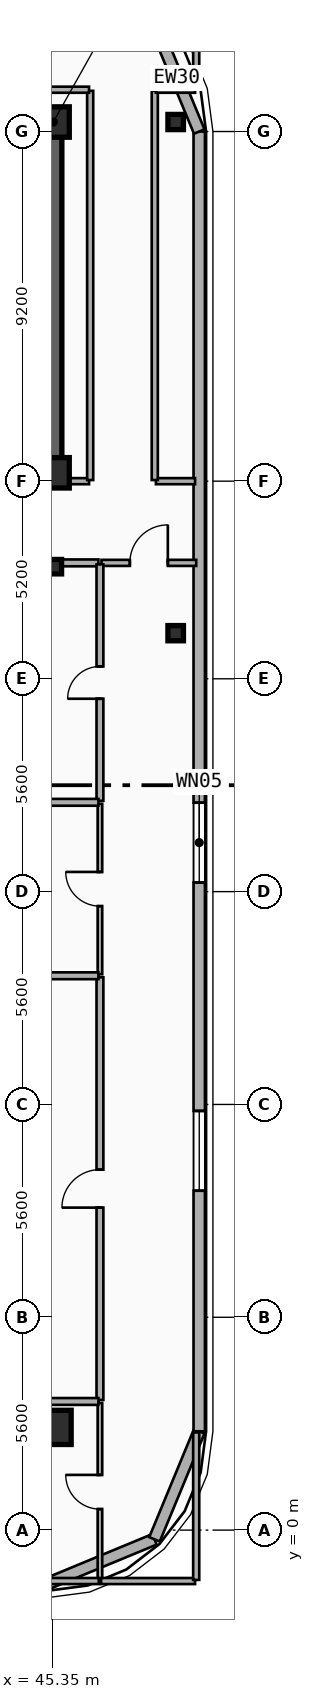
"""IFC4 building model, lengths in metres.
Left out: names, types, materials, properties, quantities, classifications, styles, units other than length and angle.
Written with IfcOpenShell. Run it as: python <this file> out.ifc"""

import sys

from ifc_helpers import new_model, si_unit, direction, frame, frame_2d, origin, origin_2d, place, context, subcontext, project, spatial, rectangle, i_section, extrude, element, fill, save


model = new_model("IFC4")
c1 = context("Model", 3, precision=1e-05, world=origin(), true_north=direction((0.0, 1.0)))
c2 = subcontext(c1, "Body", "Model", "MODEL_VIEW")
j1 = project(units=[si_unit("LENGTHUNIT", "METRE"), si_unit("PLANEANGLEUNIT", "RADIAN")], contexts=[c1])
p1 = place(None, origin())
s1 = spatial("IfcSite", under=j1, at=p1, CompositionType="ELEMENT")
p2 = place(p1, origin())
s2 = spatial("IfcBuilding", under=s1, at=p2, CompositionType="ELEMENT")
p3 = place(p2, frame((0.0, 0.0, 258.4)))
s3 = spatial("IfcBuildingStorey", under=s2, at=p3, CompositionType="ELEMENT", Elevation=258.4)
p4 = place(p3, frame((12.15, 37.05, 0.0), z_axis=(0.0, 0.0, 1.0), x_axis=(1.0, 0.0, 0.0)))
e1 = element("IfcWall", 1, at=p4, inside=s3, PredefinedType="SHEAR", context=c2, shape_type="SweptSolid", body=[
    extrude(rectangle(XDim=33.23, YDim=0.45, at=frame_2d((16.615, 0.0))), origin(), (0.0, 0.0, 1.0), 3.7),
])
p5 = place(p3, frame((45.38, 27.82, 0.0), z_axis=(0.0, 0.0, 1.0), x_axis=(-1.0, 0.0, 0.0)))
e2 = element("IfcWall", 2, at=p5, inside=s3, PredefinedType="SHEAR", context=c2, shape_type="SweptSolid", body=[
    extrude(rectangle(XDim=12.23, YDim=0.45, at=frame_2d((6.115, 0.0))), origin(), (0.0, 0.0, 1.0), 3.7),
])
p6 = place(p5, frame((9.93, 0.0, 0.0)))
e3 = element("IfcOpeningElement", 3, at=p6, cuts=e2, PredefinedType="OPENING", context=c2, shape_type="SweptSolid", body=[
    extrude(rectangle(XDim=1.1, YDim=2.15, at=frame_2d((0.55, 1.075))), frame((0.0, 0.235, 0.0), z_axis=(0.0, -1.0, 0.0), x_axis=(1.0, 0.0, 0.0)), (0.0, 0.0, 1.0), 0.47),
])
p7 = place(p5, frame((6.23, 0.0, 0.0)))
e4 = element("IfcOpeningElement", 4, at=p7, cuts=e2, PredefinedType="OPENING", context=c2, shape_type="SweptSolid", body=[
    extrude(rectangle(XDim=1.1, YDim=2.15, at=frame_2d((0.55, 1.075))), frame((0.0, 0.235, 0.0), z_axis=(0.0, -1.0, 0.0), x_axis=(1.0, 0.0, 0.0)), (0.0, 0.0, 1.0), 0.47),
])
p8 = place(p3, frame((45.38, 28.045, 0.0), z_axis=(0.0, 0.0, 1.0), x_axis=(0.0, 1.0, 0.0)))
e5 = element("IfcWall", 5, at=p8, inside=s3, PredefinedType="SHEAR", context=c2, shape_type="SweptSolid", body=[
    extrude(rectangle(XDim=8.78, YDim=0.45, at=frame_2d((4.39, 0.0))), origin(), (0.0, 0.0, 1.0), 3.7),
])
for number, where, z_axis, x_axis in (
    (6, (45.4, 27.82, 0.0), (0.0, 0.0, 1.0), (1.0, 0.0, 0.0)),
    (7, (45.4, 37.05, 0.0), (0.0, 0.0, 1.0), (1.0, 0.0, 0.0)),
):
    element("IfcColumn", number, at=place(p3, frame(where, z_axis=z_axis, x_axis=x_axis)), inside=s3, PredefinedType="COLUMN", context=c2, shape_type="SweptSolid", body=[
        extrude(rectangle(XDim=0.8, YDim=0.8, at=origin_2d()), origin(), (0.0, 0.0, 1.0), 3.7),
    ])
p9 = place(p3, frame((45.4, 25.35, 0.0), z_axis=(0.0, 0.0, 1.0), x_axis=(1.0, 0.0, 0.0)))
e8 = element("IfcColumn", 8, at=p9, inside=s3, PredefinedType="COLUMN", context=c2, shape_type="SweptSolid", body=[
    extrude(i_section(OverallWidth=0.395, OverallDepth=0.38, WebThickness=0.019, FlangeThickness=0.03, FilletRadius=0.015, at=origin_2d()), origin(), (0.0, 0.0, 1.0), 3.7),
])
p10 = place(p3, frame((45.4, 2.812, 0.0), z_axis=(0.0, -0.090221727315, 0.99592170371), x_axis=(1.0, 0.0, 0.0)))
e9 = element("IfcColumn", 9, at=p10, inside=s3, PredefinedType="COLUMN", context=c2, shape_type="SweptSolid", body=[
    extrude(rectangle(XDim=0.9, YDim=0.9, at=origin_2d()), origin(), (0.0, 0.0, 1.0), 3.715),
])
for number, where, z_axis, x_axis in (
    (10, (48.6, 23.6, 0.0), (0.0, 0.0, 1.0), (1.0, 0.0, 0.0)),
    (11, (48.6, 37.05, 0.0), (0.0, 0.0, 1.0), (1.0, 0.0, 0.0)),
):
    element("IfcColumn", number, at=place(p3, frame(where, z_axis=z_axis, x_axis=x_axis)), inside=s3, PredefinedType="COLUMN", context=c2, shape_type="SweptSolid", body=[
        extrude(i_section(OverallWidth=0.408, OverallDepth=0.4, WebThickness=0.025, FlangeThickness=0.039, FilletRadius=0.015, at=origin_2d()), origin(), (0.0, 0.0, 1.0), 3.7),
    ])
p11 = place(p3, frame((48.042, -0.243, 0.0), z_axis=(0.0, 0.0, 1.0), x_axis=(-0.92389884758, -0.382636798336, 0.0)))
e12 = element("IfcWall", 12, at=p11, inside=s3, PredefinedType="SOLIDWALL", context=c2, shape_type="SweptSolid", body=[
    extrude(rectangle(XDim=3.077, YDim=0.3, at=frame_2d((1.538, 0.0))), origin(), (0.0, 0.0, 1.0), 3.42),
])
p12 = place(p3, frame((49.22, 2.6, 0.0), z_axis=(0.0, 0.0, 1.0), x_axis=(-0.382676475685, -0.923882414032, 0.0)))
e13 = element("IfcWall", 13, at=p12, inside=s3, PredefinedType="SOLIDWALL", context=c2, shape_type="SweptSolid", body=[
    extrude(rectangle(XDim=3.077, YDim=0.3, at=frame_2d((1.539, 0.0))), origin(), (0.0, 0.0, 1.0), 3.42),
])
p13 = place(p3, frame((49.22, 36.8, 0.0), z_axis=(0.0, 0.0, 1.0), x_axis=(0.0, -1.0, 0.0)))
e14 = element("IfcWall", 14, at=p13, inside=s3, PredefinedType="SOLIDWALL", context=c2, shape_type="SweptSolid", body=[
    extrude(rectangle(XDim=34.2, YDim=0.3, at=frame_2d((17.1, 0.0))), origin(), (0.0, 0.0, 1.0), 3.42),
])
p14 = place(p13, frame((17.66, 0.0, 0.75)))
e15 = element("IfcOpeningElement", 15, at=p14, cuts=e14, PredefinedType="OPENING", context=c2, shape_type="SweptSolid", body=[
    extrude(rectangle(XDim=2.1, YDim=2.1, at=frame_2d((1.05, 1.05))), frame((0.0, 0.16, 0.0), z_axis=(0.0, -1.0, 0.0), x_axis=(1.0, 0.0, 0.0)), (0.0, 0.0, 1.0), 0.32),
])
p15 = place(p13, frame((25.77, 0.0, 0.75)))
e16 = element("IfcOpeningElement", 16, at=p15, cuts=e14, PredefinedType="OPENING", context=c2, shape_type="SweptSolid", body=[
    extrude(rectangle(XDim=2.1, YDim=2.1, at=frame_2d((1.05, 1.05))), frame((0.0, 0.16, 0.0), z_axis=(0.0, -1.0, 0.0), x_axis=(1.0, 0.0, 0.0)), (0.0, 0.0, 1.0), 0.32),
])
p16 = place(p3, frame((48.042, 39.643, 0.0), z_axis=(0.0, 0.0, 1.0), x_axis=(0.382704529509, -0.923870793506, 0.0)))
e17 = element("IfcWall", 17, at=p16, inside=s3, PredefinedType="SOLIDWALL", context=c2, shape_type="SweptSolid", body=[
    extrude(rectangle(XDim=3.077, YDim=0.3, at=frame_2d((1.538, 0.0))), origin(), (0.0, 0.0, 1.0), 3.42),
])
p17 = place(p3, frame((46.647, 25.45, 0.0), z_axis=(0.0, 0.0, 1.0), x_axis=(1.0, 0.0, 0.0)))
e18 = element("IfcWall", 18, at=p17, inside=s3, PredefinedType="PARTITIONING", context=c2, shape_type="SweptSolid", body=[
    extrude(rectangle(XDim=2.493, YDim=0.16, at=frame_2d((1.247, 0.0))), origin(), (0.0, 0.0, 1.0), 3.42),
])
p18 = place(p17, frame((0.747, 0.0, 0.0)))
e19 = element("IfcOpeningElement", 19, at=p18, cuts=e18, PredefinedType="OPENING", context=c2, shape_type="SweptSolid", body=[
    extrude(rectangle(XDim=1.0, YDim=2.15, at=frame_2d((0.5, 1.075))), frame((0.0, 0.09, 0.0), z_axis=(0.0, -1.0, 0.0), x_axis=(1.0, 0.0, 0.0)), (0.0, 0.0, 1.0), 0.18),
])
p19 = place(p3, frame((43.79, 25.45, 0.0), z_axis=(0.0, 0.0, 1.0), x_axis=(1.0, 0.0, 0.0)))
e20 = element("IfcWall", 20, at=p19, inside=s3, PredefinedType="PLUMBINGWALL", context=c2, shape_type="SweptSolid", body=[
    extrude(rectangle(XDim=2.777, YDim=0.18, at=frame_2d((1.388, 0.0))), origin(), (0.0, 0.0, 1.0), 2.7),
])
p20 = place(p3, frame((46.607, -1.34, 0.0), z_axis=(0.0, 0.0, 1.0), x_axis=(0.0, 1.0, 0.0)))
e21 = element("IfcWall", 21, at=p20, inside=s3, PredefinedType="PARTITIONING", context=c2, shape_type="SweptSolid", body=[
    extrude(rectangle(XDim=4.685, YDim=0.12, at=frame_2d((2.343, 0.0))), origin(), (0.0, 0.0, 1.0), 3.42),
])
p21 = place(p20, frame((1.893, 0.0, 0.0)))
e22 = element("IfcOpeningElement", 22, at=p21, cuts=e21, PredefinedType="OPENING", context=c2, shape_type="SweptSolid", body=[
    extrude(rectangle(XDim=0.9, YDim=2.1, at=frame_2d((0.45, 1.05))), frame((0.0, 0.07, 0.0), z_axis=(0.0, -1.0, 0.0), x_axis=(1.0, 0.0, 0.0)), (0.0, 0.0, 1.0), 0.14),
])
p22 = place(p3, frame((46.607, 3.425, 0.0), z_axis=(0.0, 0.0, 1.0), x_axis=(0.0, 1.0, 0.0)))
e23 = element("IfcWall", 23, at=p22, inside=s3, PredefinedType="PLUMBINGWALL", context=c2, shape_type="SweptSolid", body=[
    extrude(rectangle(XDim=11.121, YDim=0.18, at=frame_2d((5.561, 0.0))), origin(), (0.0, 0.0, 1.0), 3.42),
])
p23 = place(p22, frame((5.061, 0.0, 0.0)))
e24 = element("IfcOpeningElement", 24, at=p23, cuts=e23, PredefinedType="OPENING", context=c2, shape_type="SweptSolid", body=[
    extrude(rectangle(XDim=1.0, YDim=2.15, at=frame_2d((0.5, 1.075))), frame((0.0, 0.1, 0.0), z_axis=(0.0, -1.0, 0.0), x_axis=(1.0, 0.0, 0.0)), (0.0, 0.0, 1.0), 0.2),
])
p24 = place(p3, frame((46.607, 14.626, 0.0), z_axis=(0.0, 0.0, 1.0), x_axis=(0.0, 1.0, 0.0)))
e25 = element("IfcWall", 25, at=p24, inside=s3, PredefinedType="PARTITIONING", context=c2, shape_type="SweptSolid", body=[
    extrude(rectangle(XDim=4.484, YDim=0.12, at=frame_2d((2.242, 0.0))), origin(), (0.0, 0.0, 1.0), 3.42),
])
p25 = place(p24, frame((1.792, 0.0, 0.0)))
e26 = element("IfcOpeningElement", 26, at=p25, cuts=e25, PredefinedType="OPENING", context=c2, shape_type="SweptSolid", body=[
    extrude(rectangle(XDim=0.9, YDim=2.1, at=frame_2d((0.45, 1.05))), frame((0.0, 0.07, 0.0), z_axis=(0.0, -1.0, 0.0), x_axis=(1.0, 0.0, 0.0)), (0.0, 0.0, 1.0), 0.14),
])
p26 = place(p3, frame((46.607, 19.19, 0.0), z_axis=(0.0, 0.0, 1.0), x_axis=(0.0, 1.0, 0.0)))
e27 = element("IfcWall", 27, at=p26, inside=s3, PredefinedType="PLUMBINGWALL", context=c2, shape_type="SweptSolid", body=[
    extrude(rectangle(XDim=6.22, YDim=0.18, at=frame_2d((3.11, 0.0))), origin(), (0.0, 0.0, 1.0), 2.9),
])
p27 = place(p26, frame((2.685, 0.0, 0.0)))
e28 = element("IfcOpeningElement", 28, at=p27, cuts=e27, PredefinedType="OPENING", context=c2, shape_type="SweptSolid", body=[
    extrude(rectangle(XDim=0.85, YDim=2.1, at=frame_2d((0.425, 1.05))), frame((0.0, 0.1, 0.0), z_axis=(0.0, -1.0, 0.0), x_axis=(1.0, 0.0, 0.0)), (0.0, 0.0, 1.0), 0.2),
])
for number, where, z_axis, x_axis in (
    (29, (43.79, 3.385, 0.0), (0.0, 0.0, 1.0), (1.0, 0.0, 0.0)),
    (30, (43.79, 14.586, 0.0), (0.0, 0.0, 1.0), (1.0, 0.0, 0.0)),
    (31, (43.79, 19.15, 0.0), (0.0, 0.0, 1.0), (1.0, 0.0, 0.0)),
):
    element("IfcWall", number, at=place(p3, frame(where, z_axis=z_axis, x_axis=x_axis)), inside=s3, PredefinedType="PLUMBINGWALL", context=c2, shape_type="SweptSolid", body=[
        extrude(rectangle(XDim=2.777, YDim=0.18, at=frame_2d((1.388, 0.0))), origin(), (0.0, 0.0, 1.0), 2.7),
    ])
p28 = place(p3, frame((45.41, 27.6, 0.0), z_axis=(0.0, 0.0, 1.0), x_axis=(1.0, 0.0, 0.0)))
e32 = element("IfcWall", 32, at=p28, inside=s3, PredefinedType="PARTITIONING", context=c2, shape_type="SweptSolid", body=[
    extrude(rectangle(XDim=0.91, YDim=0.16, at=frame_2d((0.455, 0.0))), origin(), (0.0, 0.0, 1.0), 2.49),
])
p29 = place(p3, frame((48.08, 27.6, 0.0), z_axis=(0.0, 0.0, 1.0), x_axis=(1.0, 0.0, 0.0)))
e33 = element("IfcWall", 33, at=p29, inside=s3, PredefinedType="PARTITIONING", context=c2, shape_type="SweptSolid", body=[
    extrude(rectangle(XDim=1.03, YDim=0.16, at=frame_2d((0.515, 0.0))), origin(), (0.0, 0.0, 1.0), 3.42),
])
for number, where, z_axis, x_axis in (
    (34, (46.35, 27.63, 0.0), (0.0, 0.0, 1.0), (0.0, 1.0, 0.0)),
    (35, (48.05, 27.63, 0.0), (0.0, 0.0, 1.0), (0.0, 1.0, 0.0)),
):
    element("IfcWall", number, at=place(p3, frame(where, z_axis=z_axis, x_axis=x_axis)), inside=s3, PredefinedType="PARTITIONING", context=c2, shape_type="SweptSolid", body=[
        extrude(rectangle(XDim=10.24, YDim=0.16, at=frame_2d((5.12, 0.0))), origin(), (0.0, 0.0, 1.0), 2.9),
    ])
p30 = place(p3, frame((11.28, 37.9, 0.0), z_axis=(0.0, 0.0, 1.0), x_axis=(1.0, 0.0, 0.0)))
e36 = element("IfcWall", 36, at=p30, inside=s3, PredefinedType="PARTITIONING", context=c2, shape_type="SweptSolid", body=[
    extrude(rectangle(XDim=35.04, YDim=0.16, at=frame_2d((17.52, 0.0))), origin(), (0.0, 0.0, 1.0), 3.42),
])
p31 = place(p3, frame((48.08, 37.9, 0.0), z_axis=(0.0, 0.0, 1.0), x_axis=(1.0, 0.0, 0.0)))
e37 = element("IfcWall", 37, at=p31, inside=s3, PredefinedType="PARTITIONING", context=c2, shape_type="SweptSolid", body=[
    extrude(rectangle(XDim=1.03, YDim=0.16, at=frame_2d((0.515, 0.0))), origin(), (0.0, 0.0, 1.0), 3.42),
])
p32 = place(p3, frame((49.14, 37.93, 0.0), z_axis=(0.0, 0.0, 1.0), x_axis=(0.0, 1.0, 0.0)))
e38 = element("IfcWall", 38, at=p32, inside=s3, PredefinedType="PARTITIONING", context=c2, shape_type="SweptSolid", body=[
    extrude(rectangle(XDim=1.44, YDim=0.16, at=frame_2d((0.72, 0.0))), origin(), (0.0, 0.0, 1.0), 3.42),
])
p33 = place(p3, frame((46.637, -1.34, 0.0), z_axis=(0.0, 0.0, 1.0), x_axis=(1.0, 0.0, 0.0)))
e39 = element("IfcWall", 39, at=p33, inside=s3, PredefinedType="PARTITIONING", context=c2, shape_type="SweptSolid", body=[
    extrude(rectangle(XDim=2.473, YDim=0.16, at=frame_2d((1.237, 0.0))), origin(), (0.0, 0.0, 1.0), 3.42),
])
p34 = place(p3, frame((49.14, -1.31, 0.0), z_axis=(0.0, 0.0, 1.0), x_axis=(0.0, 1.0, 0.0)))
e40 = element("IfcWall", 40, at=p34, inside=s3, PredefinedType="PARTITIONING", context=c2, shape_type="SweptSolid", body=[
    extrude(rectangle(XDim=3.88, YDim=0.16, at=frame_2d((1.94, 0.0))), origin(), (0.0, 0.0, 1.0), 3.42),
])
p35 = place(p3, frame((45.23, -1.34, 0.0), z_axis=(0.0, 0.0, 1.0), x_axis=(1.0, 0.0, 0.0)))
e41 = element("IfcWall", 41, at=p35, inside=s3, PredefinedType="PARTITIONING", context=c2, shape_type="SweptSolid", body=[
    extrude(rectangle(XDim=1.347, YDim=0.16, at=frame_2d((0.673, 0.0))), origin(), (0.0, 0.0, 1.0), 3.42),
])
p36 = place(p14, origin())
e42 = element("IfcWindow", 42, at=p36, inside=s3, PartitioningType="SINGLE_PANEL", PredefinedType="WINDOW", context=c2, shape_type="SweptSolid", body=[
    extrude(rectangle(XDim=2.1, YDim=2.1, at=frame_2d((1.05, 1.05))), frame((0.0, 0.03, 0.0), z_axis=(0.0, -1.0, 0.0), x_axis=(1.0, 0.0, 0.0)), (0.0, 0.0, 1.0), 0.06),
])
fill(e15, e42)
p37 = place(p15, origin())
e43 = element("IfcWindow", 43, at=p37, inside=s3, PartitioningType="SINGLE_PANEL", PredefinedType="WINDOW", context=c2, shape_type="SweptSolid", body=[
    extrude(rectangle(XDim=2.1, YDim=2.1, at=frame_2d((1.05, 1.05))), frame((0.0, 0.03, 0.0), z_axis=(0.0, -1.0, 0.0), x_axis=(1.0, 0.0, 0.0)), (0.0, 0.0, 1.0), 0.06),
])
fill(e16, e43)
p38 = place(p18, origin())
e44 = element("IfcDoor", 44, at=p38, inside=s3, OperationType="SINGLE_SWING_RIGHT", PredefinedType="DOOR", context=c2, shape_type="SweptSolid", body=[
    extrude(rectangle(XDim=1.0, YDim=2.15, at=frame_2d((0.5, 1.075))), frame((0.0, 0.025, 0.0), z_axis=(0.0, -1.0, 0.0), x_axis=(1.0, 0.0, 0.0)), (0.0, 0.0, 1.0), 0.05),
])
fill(e19, e44)
p39 = place(p21, origin())
e45 = element("IfcDoor", 45, at=p39, inside=s3, OperationType="SINGLE_SWING_RIGHT", PredefinedType="DOOR", context=c2, shape_type="SweptSolid", body=[
    extrude(rectangle(XDim=0.9, YDim=2.1, at=frame_2d((0.45, 1.05))), frame((0.0, 0.025, 0.0), z_axis=(0.0, -1.0, 0.0), x_axis=(1.0, 0.0, 0.0)), (0.0, 0.0, 1.0), 0.05),
])
fill(e22, e45)
p40 = place(p23, origin())
e46 = element("IfcDoor", 46, at=p40, inside=s3, OperationType="SINGLE_SWING_LEFT", PredefinedType="DOOR", context=c2, shape_type="SweptSolid", body=[
    extrude(rectangle(XDim=1.0, YDim=2.15, at=frame_2d((0.5, 1.075))), frame((0.0, 0.025, 0.0), z_axis=(0.0, -1.0, 0.0), x_axis=(1.0, 0.0, 0.0)), (0.0, 0.0, 1.0), 0.05),
])
fill(e24, e46)
p41 = place(p25, origin())
e47 = element("IfcDoor", 47, at=p41, inside=s3, OperationType="SINGLE_SWING_RIGHT", PredefinedType="DOOR", context=c2, shape_type="SweptSolid", body=[
    extrude(rectangle(XDim=0.9, YDim=2.1, at=frame_2d((0.45, 1.05))), frame((0.0, 0.025, 0.0), z_axis=(0.0, -1.0, 0.0), x_axis=(1.0, 0.0, 0.0)), (0.0, 0.0, 1.0), 0.05),
])
fill(e26, e47)
p42 = place(p27, origin())
e48 = element("IfcDoor", 48, at=p42, inside=s3, OperationType="SINGLE_SWING_LEFT", PredefinedType="DOOR", context=c2, shape_type="SweptSolid", body=[
    extrude(rectangle(XDim=0.85, YDim=2.1, at=frame_2d((0.425, 1.05))), frame((0.0, 0.025, 0.0), z_axis=(0.0, -1.0, 0.0), x_axis=(1.0, 0.0, 0.0)), (0.0, 0.0, 1.0), 0.05),
])
fill(e28, e48)
save(model, sys.argv[1])
